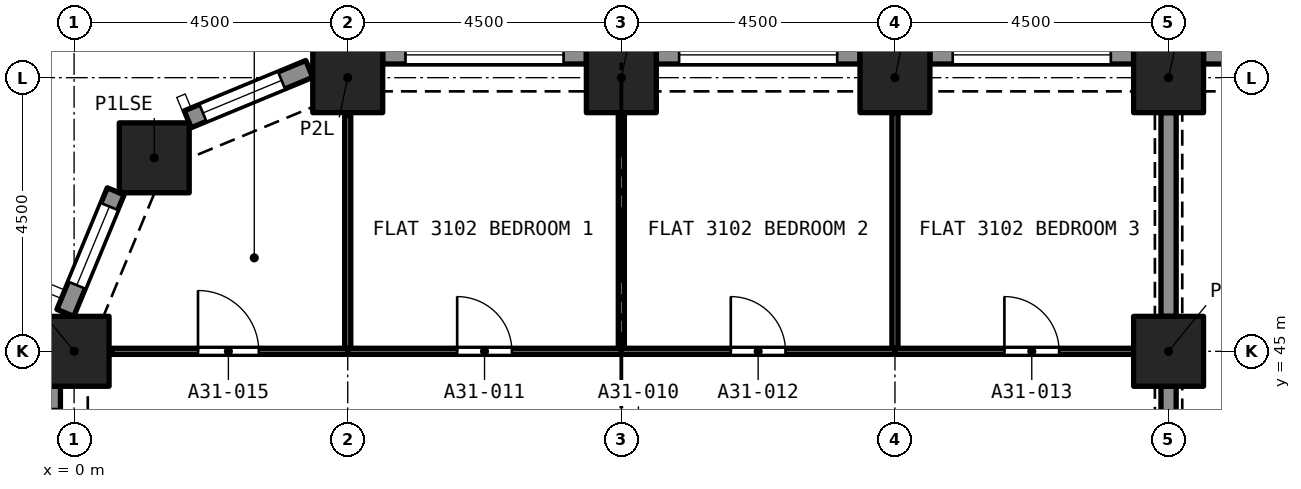
"""IFC4 building model, lengths in metres.
Left out: names, types, materials, properties, quantities, classifications, styles, units other than length and angle.
Written with IfcOpenShell. Run it as: python <this file> out.ifc"""

import sys

from ifc_helpers import new_model, si_unit, direction, frame, frame_2d, origin, origin_2d, place, context, subcontext, project, spatial, rectangle, extrude, element, fill, save


model = new_model("IFC4")
c1 = context("Model", 3, precision=1e-05, world=origin(), true_north=direction((0.0, 1.0)))
c2 = subcontext(c1, "Body", "Model", "MODEL_VIEW")
j1 = project(units=[si_unit("LENGTHUNIT", "METRE"), si_unit("PLANEANGLEUNIT", "RADIAN")], contexts=[c1])
p1 = place(None, origin())
s1 = spatial("IfcSite", under=j1, at=p1, CompositionType="ELEMENT")
p2 = place(p1, origin())
s2 = spatial("IfcBuilding", under=s1, at=p2, CompositionType="ELEMENT")
p3 = place(p2, frame((0.0, 0.0, 112.0)))
s3 = spatial("IfcBuildingStorey", under=s2, at=p3, CompositionType="ELEMENT", Elevation=112.0)
for number, where, z_axis, x_axis in (
    (1, (0.0, 45.0, 0.0), (0.0, 0.0, 1.0), (1.0, 0.0, 0.0)),
    (2, (18.0, 45.0, 0.0), (0.0, 0.0, 1.0), (1.0, 0.0, 0.0)),
    (3, (1.318, 48.182, 0.0), (0.0, 0.0, 1.0), (1.0, 0.0, 0.0)),
    (4, (4.5, 49.5, 0.0), (0.0, 0.0, 1.0), (1.0, 0.0, 0.0)),
    (5, (9.0, 49.5, 0.0), (0.0, 0.0, 1.0), (1.0, 0.0, 0.0)),
    (6, (13.5, 49.5, 0.0), (0.0, 0.0, 1.0), (1.0, 0.0, 0.0)),
    (7, (18.0, 49.5, 0.0), (0.0, 0.0, 1.0), (1.0, 0.0, 0.0)),
):
    element("IfcColumn", number, at=place(p3, frame(where, z_axis=z_axis, x_axis=x_axis)), inside=s3, PredefinedType="COLUMN", context=c2, shape_type="SweptSolid", body=[
        extrude(rectangle(XDim=1.15, YDim=1.15, at=origin_2d()), origin(), (0.0, 0.0, 1.0), 3.2),
    ])
p4 = place(p3, frame((18.575, 49.875, 0.0), z_axis=(0.0, 0.0, 1.0), x_axis=(1.0, 0.0, 0.0)))
e8 = element("IfcWall", 8, at=p4, inside=s3, PredefinedType="SOLIDWALL", context=c2, shape_type="SweptSolid", body=[
    extrude(rectangle(XDim=3.35, YDim=0.3, at=frame_2d((1.675, 0.0))), origin(), (0.0, 0.0, 1.0), 3.2),
])
p5 = place(p4, frame((0.375, 0.0, 0.45)))
e9 = element("IfcOpeningElement", 9, at=p5, cuts=e8, PredefinedType="OPENING", context=c2, shape_type="SweptSolid", body=[
    extrude(rectangle(XDim=2.6, YDim=1.95, at=frame_2d((1.3, 0.975))), frame((0.0, 0.16, 0.0), z_axis=(0.0, -1.0, 0.0), x_axis=(1.0, 0.0, 0.0)), (0.0, 0.0, 1.0), 0.32),
])
p6 = place(p3, frame((14.075, 49.875, 0.0), z_axis=(0.0, 0.0, 1.0), x_axis=(1.0, 0.0, 0.0)))
e10 = element("IfcWall", 10, at=p6, inside=s3, PredefinedType="SOLIDWALL", context=c2, shape_type="SweptSolid", body=[
    extrude(rectangle(XDim=3.35, YDim=0.3, at=frame_2d((1.675, 0.0))), origin(), (0.0, 0.0, 1.0), 3.2),
])
p7 = place(p6, frame((0.375, 0.0, 0.45)))
e11 = element("IfcOpeningElement", 11, at=p7, cuts=e10, PredefinedType="OPENING", context=c2, shape_type="SweptSolid", body=[
    extrude(rectangle(XDim=2.6, YDim=1.95, at=frame_2d((1.3, 0.975))), frame((0.0, 0.16, 0.0), z_axis=(0.0, -1.0, 0.0), x_axis=(1.0, 0.0, 0.0)), (0.0, 0.0, 1.0), 0.32),
])
p8 = place(p3, frame((9.575, 49.875, 0.0), z_axis=(0.0, 0.0, 1.0), x_axis=(1.0, 0.0, 0.0)))
e12 = element("IfcWall", 12, at=p8, inside=s3, PredefinedType="SOLIDWALL", context=c2, shape_type="SweptSolid", body=[
    extrude(rectangle(XDim=3.35, YDim=0.3, at=frame_2d((1.675, 0.0))), origin(), (0.0, 0.0, 1.0), 3.2),
])
p9 = place(p8, frame((0.375, 0.0, 0.45)))
e13 = element("IfcOpeningElement", 13, at=p9, cuts=e12, PredefinedType="OPENING", context=c2, shape_type="SweptSolid", body=[
    extrude(rectangle(XDim=2.6, YDim=1.95, at=frame_2d((1.3, 0.975))), frame((0.0, 0.16, 0.0), z_axis=(0.0, -1.0, 0.0), x_axis=(1.0, 0.0, 0.0)), (0.0, 0.0, 1.0), 0.32),
])
p10 = place(p3, frame((5.075, 49.875, 0.0), z_axis=(0.0, 0.0, 1.0), x_axis=(1.0, 0.0, 0.0)))
e14 = element("IfcWall", 14, at=p10, inside=s3, PredefinedType="SOLIDWALL", context=c2, shape_type="SweptSolid", body=[
    extrude(rectangle(XDim=3.35, YDim=0.3, at=frame_2d((1.675, 0.0))), origin(), (0.0, 0.0, 1.0), 3.2),
])
p11 = place(p10, frame((0.375, 0.0, 0.45)))
e15 = element("IfcOpeningElement", 15, at=p11, cuts=e14, PredefinedType="OPENING", context=c2, shape_type="SweptSolid", body=[
    extrude(rectangle(XDim=2.6, YDim=1.95, at=frame_2d((1.3, 0.975))), frame((0.0, 0.16, 0.0), z_axis=(0.0, -1.0, 0.0), x_axis=(1.0, 0.0, 0.0)), (0.0, 0.0, 1.0), 0.32),
])
p12 = place(p3, frame((1.869, 48.816, 0.0), z_axis=(0.0, 0.0, 1.0), x_axis=(0.923862802911, 0.382723818695, 0.0)))
e16 = element("IfcWall", 16, at=p12, inside=s3, PredefinedType="SOLIDWALL", context=c2, shape_type="SweptSolid", body=[
    extrude(rectangle(XDim=2.164, YDim=0.3, at=frame_2d((1.082, 0.0))), origin(), (0.0, 0.0, 1.0), 3.2),
])
p13 = place(p12, frame((0.271, 0.0, 0.45)))
e17 = element("IfcOpeningElement", 17, at=p13, cuts=e16, PredefinedType="OPENING", context=c2, shape_type="SweptSolid", body=[
    extrude(rectangle(XDim=1.4, YDim=1.95, at=frame_2d((0.7, 0.975))), frame((0.0, 0.16, 0.0), z_axis=(0.0, -1.0, 0.0), x_axis=(1.0, 0.0, 0.0)), (0.0, 0.0, 1.0), 0.32),
])
p14 = place(p3, frame((-0.144, 45.632, 0.0), z_axis=(0.0, 0.0, 1.0), x_axis=(0.382723818695, 0.923862802911, 0.0)))
e18 = element("IfcWall", 18, at=p14, inside=s3, PredefinedType="SOLIDWALL", context=c2, shape_type="SweptSolid", body=[
    extrude(rectangle(XDim=2.164, YDim=0.3, at=frame_2d((1.082, 0.0))), origin(), (0.0, 0.0, 1.0), 3.2),
])
p15 = place(p14, frame((0.493, 0.0, 0.45)))
e19 = element("IfcOpeningElement", 19, at=p15, cuts=e18, PredefinedType="OPENING", context=c2, shape_type="SweptSolid", body=[
    extrude(rectangle(XDim=1.4, YDim=1.95, at=frame_2d((0.7, 0.975))), frame((0.0, 0.16, 0.0), z_axis=(0.0, -1.0, 0.0), x_axis=(1.0, 0.0, 0.0)), (0.0, 0.0, 1.0), 0.32),
])
p16 = place(p3, frame((-0.375, 41.075, 0.0), z_axis=(0.0, 0.0, 1.0), x_axis=(0.0, 1.0, 0.0)))
e20 = element("IfcWall", 20, at=p16, inside=s3, PredefinedType="SOLIDWALL", context=c2, shape_type="SweptSolid", body=[
    extrude(rectangle(XDim=3.35, YDim=0.3, at=frame_2d((1.675, 0.0))), origin(), (0.0, 0.0, 1.0), 3.2),
])
p17 = place(p16, frame((0.375, 0.0, 0.45)))
e21 = element("IfcOpeningElement", 21, at=p17, cuts=e20, PredefinedType="OPENING", context=c2, shape_type="SweptSolid", body=[
    extrude(rectangle(XDim=2.6, YDim=1.95, at=frame_2d((1.3, 0.975))), frame((0.0, 0.16, 0.0), z_axis=(0.0, -1.0, 0.0), x_axis=(1.0, 0.0, 0.0)), (0.0, 0.0, 1.0), 0.32),
])
p18 = place(p3, frame((9.0, 45.05, 0.0), z_axis=(0.0, 0.0, 1.0), x_axis=(0.0, 1.0, 0.0)))
e22 = element("IfcWall", 22, at=p18, inside=s3, PredefinedType="PARTITIONING", context=c2, shape_type="SweptSolid", body=[
    extrude(rectangle(XDim=3.875, YDim=0.1, at=frame_2d((1.938, 0.0))), origin(), (0.0, 0.0, 1.0), 2.9),
])
p19 = place(p3, frame((4.5, 45.0, 0.0), z_axis=(0.0, 0.0, 1.0), x_axis=(1.0, 0.0, 0.0)))
e23 = element("IfcWall", 23, at=p19, inside=s3, PredefinedType="PARTITIONING", context=c2, shape_type="SweptSolid", body=[
    extrude(rectangle(XDim=4.5, YDim=0.1, at=frame_2d((2.25, 0.0))), origin(), (0.0, 0.0, 1.0), 2.9),
])
p20 = place(p19, frame((1.8, 0.0, 0.0)))
e24 = element("IfcOpeningElement", 24, at=p20, cuts=e23, PredefinedType="OPENING", context=c2, shape_type="SweptSolid", body=[
    extrude(rectangle(XDim=0.9, YDim=2.1, at=frame_2d((0.45, 1.05))), frame((0.0, 0.06, 0.0), z_axis=(0.0, -1.0, 0.0), x_axis=(1.0, 0.0, 0.0)), (0.0, 0.0, 1.0), 0.12),
])
p21 = place(p3, frame((4.5, 45.05, 0.0), z_axis=(0.0, 0.0, 1.0), x_axis=(0.0, 1.0, 0.0)))
e25 = element("IfcWall", 25, at=p21, inside=s3, PredefinedType="PARTITIONING", context=c2, shape_type="SweptSolid", body=[
    extrude(rectangle(XDim=3.828, YDim=0.1, at=frame_2d((1.914, 0.0))), origin(), (0.0, 0.0, 1.0), 2.9),
])
p22 = place(p3, frame((13.5, 45.05, 0.0), z_axis=(0.0, 0.0, 1.0), x_axis=(0.0, 1.0, 0.0)))
e26 = element("IfcWall", 26, at=p22, inside=s3, PredefinedType="PARTITIONING", context=c2, shape_type="SweptSolid", body=[
    extrude(rectangle(XDim=3.875, YDim=0.1, at=frame_2d((1.938, 0.0))), origin(), (0.0, 0.0, 1.0), 2.9),
])
p23 = place(p3, frame((9.0, 45.0, 0.0), z_axis=(0.0, 0.0, 1.0), x_axis=(1.0, 0.0, 0.0)))
e27 = element("IfcWall", 27, at=p23, inside=s3, PredefinedType="PARTITIONING", context=c2, shape_type="SweptSolid", body=[
    extrude(rectangle(XDim=4.5, YDim=0.1, at=frame_2d((2.25, 0.0))), origin(), (0.0, 0.0, 1.0), 2.9),
])
p24 = place(p23, frame((1.8, 0.0, 0.0)))
e28 = element("IfcOpeningElement", 28, at=p24, cuts=e27, PredefinedType="OPENING", context=c2, shape_type="SweptSolid", body=[
    extrude(rectangle(XDim=0.9, YDim=2.1, at=frame_2d((0.45, 1.05))), frame((0.0, 0.06, 0.0), z_axis=(0.0, -1.0, 0.0), x_axis=(1.0, 0.0, 0.0)), (0.0, 0.0, 1.0), 0.12),
])
p25 = place(p3, frame((13.5, 45.0, 0.0), z_axis=(0.0, 0.0, 1.0), x_axis=(1.0, 0.0, 0.0)))
e29 = element("IfcWall", 29, at=p25, inside=s3, PredefinedType="PARTITIONING", context=c2, shape_type="SweptSolid", body=[
    extrude(rectangle(XDim=3.925, YDim=0.1, at=frame_2d((1.962, 0.0))), origin(), (0.0, 0.0, 1.0), 2.9),
])
p26 = place(p25, frame((1.8, 0.0, 0.0)))
e30 = element("IfcOpeningElement", 30, at=p26, cuts=e29, PredefinedType="OPENING", context=c2, shape_type="SweptSolid", body=[
    extrude(rectangle(XDim=0.9, YDim=2.1, at=frame_2d((0.45, 1.05))), frame((0.0, 0.06, 0.0), z_axis=(0.0, -1.0, 0.0), x_axis=(1.0, 0.0, 0.0)), (0.0, 0.0, 1.0), 0.12),
])
p27 = place(p3, frame((18.0, 45.575, 0.0), z_axis=(0.0, 0.0, 1.0), x_axis=(0.0, 1.0, 0.0)))
e31 = element("IfcWall", 31, at=p27, inside=s3, PredefinedType="PARTITIONING", context=c2, shape_type="SweptSolid", body=[
    extrude(rectangle(XDim=3.35, YDim=0.25, at=frame_2d((1.675, 0.0))), origin(), (0.0, 0.0, 1.0), 2.38),
])
p28 = place(p3, frame((0.622, 45.0, 0.0), z_axis=(0.0, 0.0, 1.0), x_axis=(1.0, 0.0, 0.0)))
e32 = element("IfcWall", 32, at=p28, inside=s3, PredefinedType="PARTITIONING", context=c2, shape_type="SweptSolid", body=[
    extrude(rectangle(XDim=3.878, YDim=0.1, at=frame_2d((1.939, 0.0))), origin(), (0.0, 0.0, 1.0), 2.9),
])
p29 = place(p28, frame((1.415, 0.0, 0.0)))
e33 = element("IfcOpeningElement", 33, at=p29, cuts=e32, PredefinedType="OPENING", context=c2, shape_type="SweptSolid", body=[
    extrude(rectangle(XDim=1.0, YDim=2.1, at=frame_2d((0.5, 1.05))), frame((0.0, 0.06, 0.0), z_axis=(0.0, -1.0, 0.0), x_axis=(1.0, 0.0, 0.0)), (0.0, 0.0, 1.0), 0.12),
])
p30 = place(p3, frame((18.0, 41.075, 0.0), z_axis=(0.0, 0.0, 1.0), x_axis=(0.0, 1.0, 0.0)))
e34 = element("IfcWall", 34, at=p30, inside=s3, PredefinedType="PARTITIONING", context=c2, shape_type="SweptSolid", body=[
    extrude(rectangle(XDim=3.35, YDim=0.25, at=frame_2d((1.675, 0.0))), origin(), (0.0, 0.0, 1.0), 2.38),
])
p31 = place(p7, origin())
e35 = element("IfcWindow", 35, at=p31, inside=s3, PartitioningType="SINGLE_PANEL", PredefinedType="WINDOW", context=c2, shape_type="SweptSolid", body=[
    extrude(rectangle(XDim=2.6, YDim=1.95, at=frame_2d((1.3, 0.975))), frame((0.0, 0.03, 0.0), z_axis=(0.0, -1.0, 0.0), x_axis=(1.0, 0.0, 0.0)), (0.0, 0.0, 1.0), 0.06),
])
fill(e11, e35)
p32 = place(p9, origin())
e36 = element("IfcWindow", 36, at=p32, inside=s3, PartitioningType="SINGLE_PANEL", PredefinedType="WINDOW", context=c2, shape_type="SweptSolid", body=[
    extrude(rectangle(XDim=2.6, YDim=1.95, at=frame_2d((1.3, 0.975))), frame((0.0, 0.03, 0.0), z_axis=(0.0, -1.0, 0.0), x_axis=(1.0, 0.0, 0.0)), (0.0, 0.0, 1.0), 0.06),
])
fill(e13, e36)
p33 = place(p11, origin())
e37 = element("IfcWindow", 37, at=p33, inside=s3, PartitioningType="SINGLE_PANEL", PredefinedType="WINDOW", context=c2, shape_type="SweptSolid", body=[
    extrude(rectangle(XDim=2.6, YDim=1.95, at=frame_2d((1.3, 0.975))), frame((0.0, 0.03, 0.0), z_axis=(0.0, -1.0, 0.0), x_axis=(1.0, 0.0, 0.0)), (0.0, 0.0, 1.0), 0.06),
])
fill(e15, e37)
p34 = place(p13, origin())
e38 = element("IfcWindow", 38, at=p34, inside=s3, PartitioningType="SINGLE_PANEL", PredefinedType="WINDOW", context=c2, shape_type="SweptSolid", body=[
    extrude(rectangle(XDim=1.4, YDim=1.95, at=frame_2d((0.7, 0.975))), frame((0.0, 0.03, 0.0), z_axis=(0.0, -1.0, 0.0), x_axis=(1.0, 0.0, 0.0)), (0.0, 0.0, 1.0), 0.06),
])
fill(e17, e38)
p35 = place(p15, origin())
e39 = element("IfcWindow", 39, at=p35, inside=s3, PartitioningType="SINGLE_PANEL", PredefinedType="WINDOW", context=c2, shape_type="SweptSolid", body=[
    extrude(rectangle(XDim=1.4, YDim=1.95, at=frame_2d((0.7, 0.975))), frame((0.0, 0.03, 0.0), z_axis=(0.0, -1.0, 0.0), x_axis=(1.0, 0.0, 0.0)), (0.0, 0.0, 1.0), 0.06),
])
fill(e19, e39)
p36 = place(p20, origin())
e40 = element("IfcDoor", 40, at=p36, inside=s3, OperationType="SINGLE_SWING_RIGHT", PredefinedType="DOOR", context=c2, shape_type="SweptSolid", body=[
    extrude(rectangle(XDim=0.9, YDim=2.1, at=frame_2d((0.45, 1.05))), frame((0.0, 0.025, 0.0), z_axis=(0.0, -1.0, 0.0), x_axis=(1.0, 0.0, 0.0)), (0.0, 0.0, 1.0), 0.05),
])
fill(e24, e40)
p37 = place(p24, origin())
e41 = element("IfcDoor", 41, at=p37, inside=s3, OperationType="SINGLE_SWING_LEFT", PredefinedType="DOOR", context=c2, shape_type="SweptSolid", body=[
    extrude(rectangle(XDim=0.9, YDim=2.1, at=frame_2d((0.45, 1.05))), frame((0.0, 0.025, 0.0), z_axis=(0.0, -1.0, 0.0), x_axis=(1.0, 0.0, 0.0)), (0.0, 0.0, 1.0), 0.05),
])
fill(e28, e41)
p38 = place(p26, origin())
e42 = element("IfcDoor", 42, at=p38, inside=s3, OperationType="SINGLE_SWING_RIGHT", PredefinedType="DOOR", context=c2, shape_type="SweptSolid", body=[
    extrude(rectangle(XDim=0.9, YDim=2.1, at=frame_2d((0.45, 1.05))), frame((0.0, 0.025, 0.0), z_axis=(0.0, -1.0, 0.0), x_axis=(1.0, 0.0, 0.0)), (0.0, 0.0, 1.0), 0.05),
])
fill(e30, e42)
p39 = place(p29, origin())
e43 = element("IfcDoor", 43, at=p39, inside=s3, OperationType="SINGLE_SWING_LEFT", PredefinedType="DOOR", context=c2, shape_type="SweptSolid", body=[
    extrude(rectangle(XDim=1.0, YDim=2.1, at=frame_2d((0.5, 1.05))), frame((0.0, 0.025, 0.0), z_axis=(0.0, -1.0, 0.0), x_axis=(1.0, 0.0, 0.0)), (0.0, 0.0, 1.0), 0.05),
])
fill(e33, e43)
save(model, sys.argv[1])
